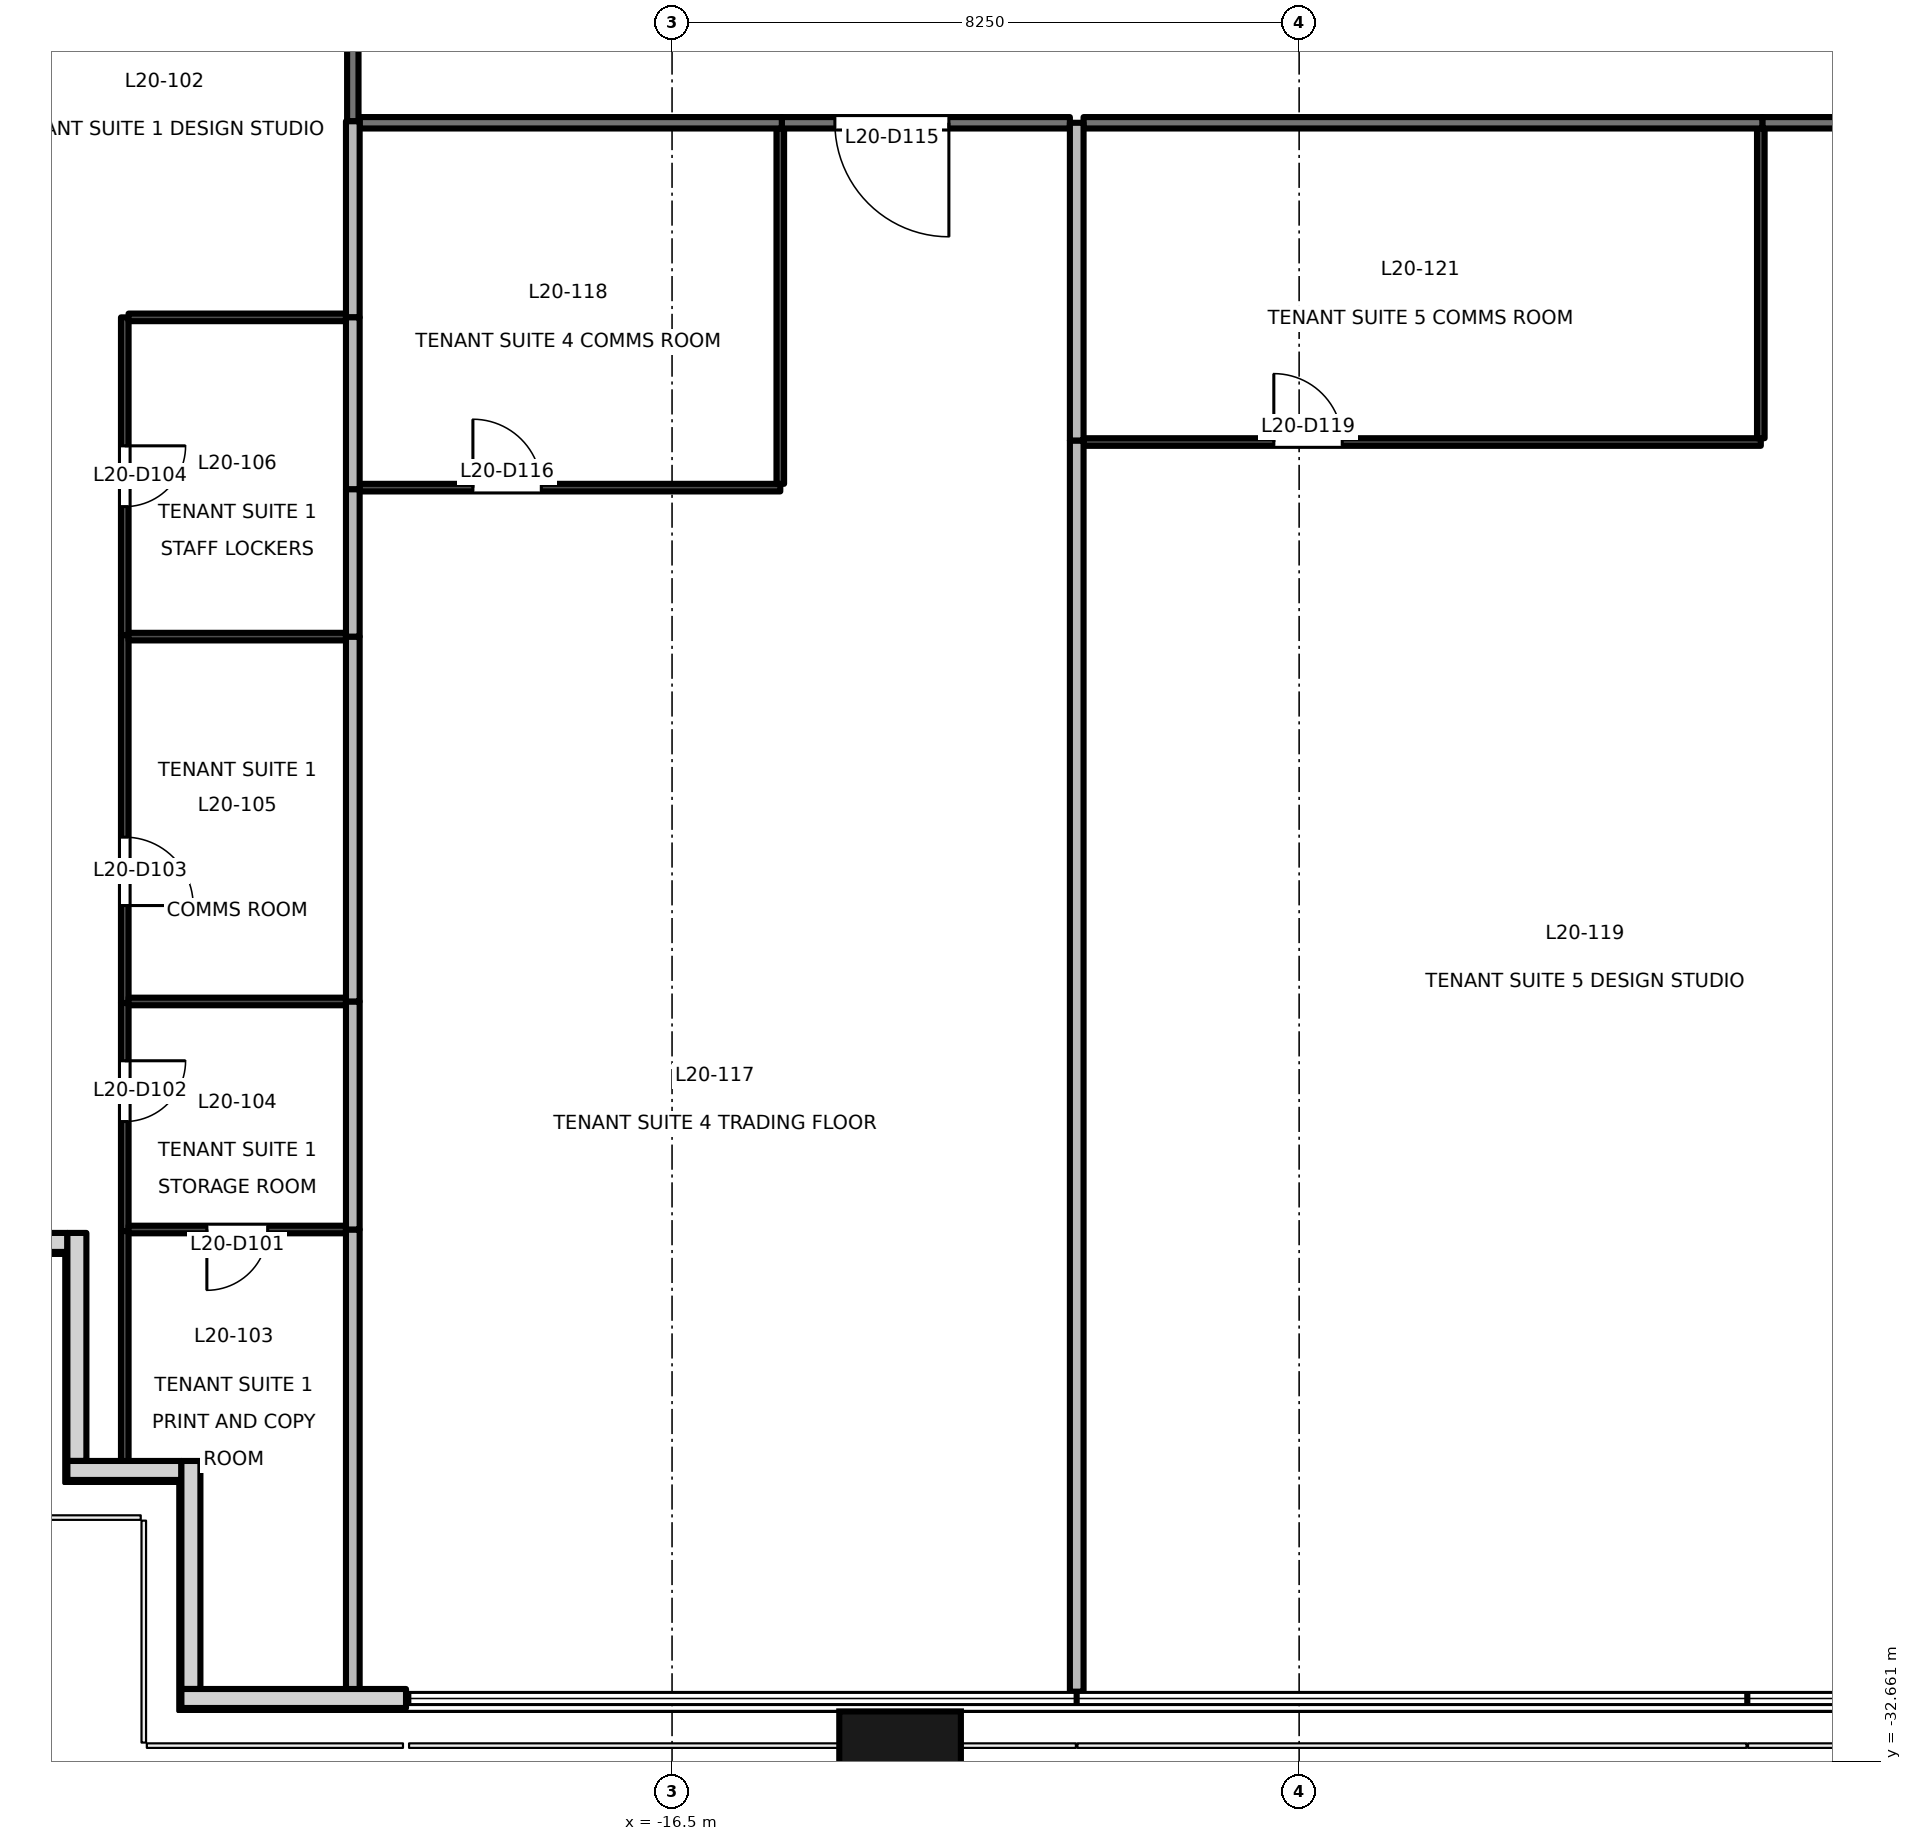
"""IFC4 building model, lengths in metres.
Left out: names, types, materials, properties, quantities, classifications, styles, units other than length and angle.
Written with IfcOpenShell. Run it as: python <this file> out.ifc"""

import sys

from ifc_helpers import new_model, si_unit, direction, frame, frame_2d, origin, origin_2d, place, context, subcontext, project, spatial, rectangle, extrude, element, fill, save


model = new_model("IFC4")
c1 = context("Model", 3, precision=1e-05, world=origin(), true_north=direction((0.0, 1.0)))
c2 = subcontext(c1, "Body", "Model", "MODEL_VIEW")
j1 = project(units=[si_unit("LENGTHUNIT", "METRE"), si_unit("PLANEANGLEUNIT", "RADIAN")], contexts=[c1])
p1 = place(None, origin())
s1 = spatial("IfcSite", under=j1, at=p1, CompositionType="ELEMENT")
p2 = place(p1, origin())
s2 = spatial("IfcBuilding", under=s1, at=p2, CompositionType="ELEMENT")
p3 = place(p2, frame((0.0, 0.0, 91.7)))
s3 = spatial("IfcBuildingStorey", under=s2, at=p3, CompositionType="ELEMENT", Elevation=91.7)
p4 = place(p3, frame((-13.5, -32.9, -0.2), z_axis=(0.0, 0.0, 1.0), x_axis=(1.0, 0.0, 0.0)))
e1 = element("IfcColumn", 1, at=p4, inside=s3, PredefinedType="COLUMN", context=c2, shape_type="SweptSolid", body=[
    extrude(rectangle(XDim=1.6, YDim=1.8, at=origin_2d()), origin(), (0.0, 0.0, 1.0), 4.0),
])
p5 = place(p3, frame((-25.91, -25.83, 0.0), z_axis=(0.0, 0.0, 1.0), x_axis=(1.0, 0.0, 0.0)))
e2 = element("IfcWall", 2, at=p5, inside=s3, PredefinedType="SOLIDWALL", context=c2, shape_type="SweptSolid", body=[
    extrude(rectangle(XDim=1.455, YDim=0.25, at=frame_2d((0.728, 0.0))), origin(), (0.0, 0.0, 1.0), 3.8),
])
p6 = place(p3, frame((-24.33, -25.705, 0.0), z_axis=(0.0, 0.0, 1.0), x_axis=(0.0, -1.0, 0.0)))
e3 = element("IfcWall", 3, at=p6, inside=s3, PredefinedType="SOLIDWALL", context=c2, shape_type="SweptSolid", body=[
    extrude(rectangle(XDim=3.0, YDim=0.25, at=frame_2d((1.5, 0.0))), origin(), (0.0, 0.0, 1.0), 3.8),
])
p7 = place(p3, frame((-24.455, -28.83, 0.0), z_axis=(0.0, 0.0, 1.0), x_axis=(1.0, 0.0, 0.0)))
e4 = element("IfcWall", 4, at=p7, inside=s3, PredefinedType="SOLIDWALL", context=c2, shape_type="SweptSolid", body=[
    extrude(rectangle(XDim=1.5, YDim=0.25, at=frame_2d((0.75, 0.0))), origin(), (0.0, 0.0, 1.0), 3.8),
])
p8 = place(p3, frame((-22.83, -28.705, 0.0), z_axis=(0.0, 0.0, 1.0), x_axis=(0.0, -1.0, 0.0)))
e5 = element("IfcWall", 5, at=p8, inside=s3, PredefinedType="SOLIDWALL", context=c2, shape_type="SweptSolid", body=[
    extrude(rectangle(XDim=3.0, YDim=0.25, at=frame_2d((1.5, 0.0))), origin(), (0.0, 0.0, 1.0), 3.8),
])
p9 = place(p3, frame((-22.955, -31.83, 0.0), z_axis=(0.0, 0.0, 1.0), x_axis=(1.0, 0.0, 0.0)))
e6 = element("IfcWall", 6, at=p9, inside=s3, PredefinedType="SOLIDWALL", context=c2, shape_type="SweptSolid", body=[
    extrude(rectangle(XDim=2.955, YDim=0.25, at=frame_2d((1.478, 0.0))), origin(), (0.0, 0.0, 1.0), 3.8),
])
p10 = place(p3, frame((-20.7, -11.08, 0.0), z_axis=(0.0, 0.0, 1.0), x_axis=(0.0, 1.0, 0.0)))
e7 = element("IfcWall", 7, at=p10, inside=s3, PredefinedType="PARTITIONING", context=c2, shape_type="SweptSolid", body=[
    extrude(rectangle(XDim=3.4, YDim=0.15, at=frame_2d((1.7, 0.0))), origin(), (0.0, 0.0, 1.0), 3.8),
])
p11 = place(p3, frame((-11.266, -11.1, 0.0), z_axis=(0.0, 0.0, 1.0), x_axis=(-1.0, 0.0, 0.0)))
e8 = element("IfcWall", 8, at=p11, inside=s3, PredefinedType="PARTITIONING", context=c2, shape_type="SweptSolid", body=[
    extrude(rectangle(XDim=3.79, YDim=0.15, at=frame_2d((1.895, 0.0))), origin(), (0.0, 0.0, 1.0), 2.8),
])
p12 = place(p11, frame((1.592, 0.0, 0.0)))
e9 = element("IfcOpeningElement", 9, at=p12, cuts=e8, PredefinedType="OPENING", context=c2, shape_type="SweptSolid", body=[
    extrude(rectangle(XDim=1.5, YDim=2.1, at=frame_2d((0.75, 1.05))), frame((0.0, 0.085, 0.0), z_axis=(0.0, -1.0, 0.0), x_axis=(1.0, 0.0, 0.0)), (0.0, 0.0, 1.0), 0.171),
])
p13 = place(p3, frame((-15.056, -11.1, 0.0), z_axis=(0.0, 0.0, 1.0), x_axis=(-1.0, 0.0, 0.0)))
e10 = element("IfcWall", 10, at=p13, inside=s3, PredefinedType="PARTITIONING", context=c2, shape_type="SweptSolid", body=[
    extrude(rectangle(XDim=5.554, YDim=0.15, at=frame_2d((2.777, 0.0))), origin(), (0.0, 0.0, 1.0), 3.8),
])
p14 = place(p3, frame((4.425, -11.1, 0.0), z_axis=(0.0, 0.0, 1.0), x_axis=(-1.0, 0.0, 0.0)))
e11 = element("IfcWall", 11, at=p14, inside=s3, PredefinedType="PARTITIONING", context=c2, shape_type="SweptSolid", body=[
    extrude(rectangle(XDim=6.581, YDim=0.15, at=frame_2d((3.291, 0.0))), origin(), (0.0, 0.0, 1.0), 2.8),
])
p15 = place(p3, frame((-2.156, -11.1, 0.0), z_axis=(0.0, 0.0, 1.0), x_axis=(-1.0, 0.0, 0.0)))
e12 = element("IfcWall", 12, at=p15, inside=s3, PredefinedType="PARTITIONING", context=c2, shape_type="SweptSolid", body=[
    extrude(rectangle(XDim=8.93, YDim=0.15, at=frame_2d((4.465, 0.0))), origin(), (0.0, 0.0, 1.0), 2.8),
])
p16 = place(p3, frame((-23.7, -25.68, 0.0), z_axis=(0.0, 0.0, 1.0), x_axis=(0.0, -1.0, 0.0)))
e13 = element("IfcWall", 13, at=p16, inside=s3, PredefinedType="PARTITIONING", context=c2, shape_type="SweptSolid", body=[
    extrude(rectangle(XDim=3.06, YDim=0.1, at=frame_2d((1.53, 0.0))), origin(), (0.0, 0.0, 1.0), 3.8),
])
p17 = place(p3, frame((-23.7, -22.68, 0.0), z_axis=(0.0, 0.0, 1.0), x_axis=(0.0, -1.0, 0.0)))
e14 = element("IfcWall", 14, at=p17, inside=s3, PredefinedType="PARTITIONING", context=c2, shape_type="SweptSolid", body=[
    extrude(rectangle(XDim=3.0, YDim=0.1, at=frame_2d((1.5, 0.0))), origin(), (0.0, 0.0, 1.0), 3.8),
])
p18 = place(p17, frame((0.76, 0.0, 0.0)))
e15 = element("IfcOpeningElement", 15, at=p18, cuts=e14, PredefinedType="OPENING", context=c2, shape_type="SweptSolid", body=[
    extrude(rectangle(XDim=0.8, YDim=2.1, at=frame_2d((0.4, 1.05))), frame((0.0, 0.061, 0.0), z_axis=(0.0, -1.0, 0.0), x_axis=(1.0, 0.0, 0.0)), (0.0, 0.0, 1.0), 0.121),
])
p19 = place(p3, frame((-23.7, -17.84, 0.0), z_axis=(0.0, 0.0, 1.0), x_axis=(0.0, -1.0, 0.0)))
e16 = element("IfcWall", 16, at=p19, inside=s3, PredefinedType="PARTITIONING", context=c2, shape_type="SweptSolid", body=[
    extrude(rectangle(XDim=4.84, YDim=0.1, at=frame_2d((2.42, 0.0))), origin(), (0.0, 0.0, 1.0), 3.8),
])
p20 = place(p19, frame((2.658, 0.0, 0.0)))
e17 = element("IfcOpeningElement", 17, at=p20, cuts=e16, PredefinedType="OPENING", context=c2, shape_type="SweptSolid", body=[
    extrude(rectangle(XDim=0.9, YDim=2.1, at=frame_2d((0.45, 1.05))), frame((0.0, 0.061, 0.0), z_axis=(0.0, -1.0, 0.0), x_axis=(1.0, 0.0, 0.0)), (0.0, 0.0, 1.0), 0.121),
])
p21 = place(p3, frame((-23.7, -13.66, 0.0), z_axis=(0.0, 0.0, 1.0), x_axis=(0.0, -1.0, 0.0)))
e18 = element("IfcWall", 18, at=p21, inside=s3, PredefinedType="PARTITIONING", context=c2, shape_type="SweptSolid", body=[
    extrude(rectangle(XDim=4.18, YDim=0.1, at=frame_2d((2.09, 0.0))), origin(), (0.0, 0.0, 1.0), 3.8),
])
p22 = place(p21, frame((1.69, 0.0, 0.0)))
e19 = element("IfcOpeningElement", 19, at=p22, cuts=e18, PredefinedType="OPENING", context=c2, shape_type="SweptSolid", body=[
    extrude(rectangle(XDim=0.8, YDim=2.1, at=frame_2d((0.4, 1.05))), frame((0.0, 0.061, 0.0), z_axis=(0.0, -1.0, 0.0), x_axis=(1.0, 0.0, 0.0)), (0.0, 0.0, 1.0), 0.121),
])
p23 = place(p3, frame((-20.79, -13.66, 0.0), z_axis=(0.0, 0.0, 1.0), x_axis=(-1.0, 0.0, 0.0)))
e20 = element("IfcWall", 20, at=p23, inside=s3, PredefinedType="PARTITIONING", context=c2, shape_type="SweptSolid", body=[
    extrude(rectangle(XDim=2.86, YDim=0.1, at=frame_2d((1.43, 0.0))), origin(), (0.0, 0.0, 1.0), 3.8),
])
p24 = place(p3, frame((-20.7, -11.08, 0.0), z_axis=(0.0, 0.0, 1.0), x_axis=(0.0, -1.0, 0.0)))
e21 = element("IfcWall", 21, at=p24, inside=s3, PredefinedType="PARTITIONING", context=c2, shape_type="SweptSolid", body=[
    extrude(rectangle(XDim=2.58, YDim=0.18, at=frame_2d((1.29, 0.0))), origin(), (0.0, 0.0, 1.0), 3.8),
])
p25 = place(p3, frame((-20.79, -25.66, 0.0), z_axis=(0.0, 0.0, 1.0), x_axis=(-1.0, 0.0, 0.0)))
e22 = element("IfcWall", 22, at=p25, inside=s3, PredefinedType="PARTITIONING", context=c2, shape_type="SweptSolid", body=[
    extrude(rectangle(XDim=2.86, YDim=0.1, at=frame_2d((1.43, 0.0))), origin(), (0.0, 0.0, 1.0), 3.8),
])
p26 = place(p25, frame((1.03, 0.0, 0.0)))
e23 = element("IfcOpeningElement", 23, at=p26, cuts=e22, PredefinedType="OPENING", context=c2, shape_type="SweptSolid", body=[
    extrude(rectangle(XDim=0.8, YDim=2.1, at=frame_2d((0.4, 1.05))), frame((0.0, 0.061, 0.0), z_axis=(0.0, -1.0, 0.0), x_axis=(1.0, 0.0, 0.0)), (0.0, 0.0, 1.0), 0.121),
])
p27 = place(p3, frame((-20.7, -25.66, 0.0), z_axis=(0.0, 0.0, 1.0), x_axis=(0.0, -1.0, 0.0)))
e24 = element("IfcWall", 24, at=p27, inside=s3, PredefinedType="PARTITIONING", context=c2, shape_type="SweptSolid", body=[
    extrude(rectangle(XDim=6.08, YDim=0.18, at=frame_2d((3.04, 0.0))), origin(), (0.0, 0.0, 1.0), 3.8),
])
p28 = place(p3, frame((-23.65, -22.66, 0.0), z_axis=(0.0, 0.0, 1.0), x_axis=(1.0, 0.0, 0.0)))
e25 = element("IfcWall", 25, at=p28, inside=s3, PredefinedType="PARTITIONING", context=c2, shape_type="SweptSolid", body=[
    extrude(rectangle(XDim=2.86, YDim=0.1, at=frame_2d((1.43, 0.0))), origin(), (0.0, 0.0, 1.0), 3.8),
])
p29 = place(p3, frame((-20.7, -22.66, 0.0), z_axis=(0.0, 0.0, 1.0), x_axis=(0.0, -1.0, 0.0)))
e26 = element("IfcWall", 26, at=p29, inside=s3, PredefinedType="PARTITIONING", context=c2, shape_type="SweptSolid", body=[
    extrude(rectangle(XDim=3.0, YDim=0.18, at=frame_2d((1.5, 0.0))), origin(), (0.0, 0.0, 1.0), 3.8),
])
p30 = place(p3, frame((-23.65, -17.86, 0.0), z_axis=(0.0, 0.0, 1.0), x_axis=(1.0, 0.0, 0.0)))
e27 = element("IfcWall", 27, at=p30, inside=s3, PredefinedType="PARTITIONING", context=c2, shape_type="SweptSolid", body=[
    extrude(rectangle(XDim=2.86, YDim=0.1, at=frame_2d((1.43, 0.0))), origin(), (0.0, 0.0, 1.0), 3.8),
])
p31 = place(p3, frame((-20.7, -17.86, 0.0), z_axis=(0.0, 0.0, 1.0), x_axis=(0.0, -1.0, 0.0)))
e28 = element("IfcWall", 28, at=p31, inside=s3, PredefinedType="PARTITIONING", context=c2, shape_type="SweptSolid", body=[
    extrude(rectangle(XDim=4.8, YDim=0.18, at=frame_2d((2.4, 0.0))), origin(), (0.0, 0.0, 1.0), 3.8),
])
p32 = place(p3, frame((-20.7, -15.92, 0.0), z_axis=(0.0, 0.0, 1.0), x_axis=(0.0, -1.0, 0.0)))
e29 = element("IfcWall", 29, at=p32, inside=s3, PredefinedType="PARTITIONING", context=c2, shape_type="SweptSolid", body=[
    extrude(rectangle(XDim=1.94, YDim=0.18, at=frame_2d((0.97, 0.0))), origin(), (0.0, 0.0, 1.0), 3.8),
])
p33 = place(p3, frame((-20.7, -13.66, 0.0), z_axis=(0.0, 0.0, 1.0), x_axis=(0.0, -1.0, 0.0)))
e30 = element("IfcWall", 30, at=p33, inside=s3, PredefinedType="PARTITIONING", context=c2, shape_type="SweptSolid", body=[
    extrude(rectangle(XDim=2.26, YDim=0.18, at=frame_2d((1.13, 0.0))), origin(), (0.0, 0.0, 1.0), 3.8),
])
p34 = place(p3, frame((-20.61, -15.9, 0.0), z_axis=(0.0, 0.0, 1.0), x_axis=(1.0, 0.0, 0.0)))
e31 = element("IfcWall", 31, at=p34, inside=s3, PredefinedType="PARTITIONING", context=c2, shape_type="SweptSolid", body=[
    extrude(rectangle(XDim=5.534, YDim=0.1, at=frame_2d((2.767, 0.0))), origin(), (0.0, 0.0, 1.0), 3.8),
])
p35 = place(p34, frame((1.49, 0.0, 0.0)))
e32 = element("IfcOpeningElement", 32, at=p35, cuts=e31, PredefinedType="OPENING", context=c2, shape_type="SweptSolid", body=[
    extrude(rectangle(XDim=0.9, YDim=2.1, at=frame_2d((0.45, 1.05))), frame((0.0, 0.061, 0.0), z_axis=(0.0, -1.0, 0.0), x_axis=(1.0, 0.0, 0.0)), (0.0, 0.0, 1.0), 0.121),
])
p36 = place(p3, frame((-15.076, -15.85, 0.0), z_axis=(0.0, 0.0, 1.0), x_axis=(0.0, 1.0, 0.0)))
e33 = element("IfcWall", 33, at=p36, inside=s3, PredefinedType="PARTITIONING", context=c2, shape_type="SweptSolid", body=[
    extrude(rectangle(XDim=4.675, YDim=0.1, at=frame_2d((2.337, 0.0))), origin(), (0.0, 0.0, 1.0), 3.8),
])
p37 = place(p3, frame((-11.176, -15.28, 0.0), z_axis=(0.0, 0.0, 1.0), x_axis=(0.0, -1.0, 0.0)))
e34 = element("IfcWall", 34, at=p37, inside=s3, PredefinedType="PARTITIONING", context=c2, shape_type="SweptSolid", body=[
    extrude(rectangle(XDim=16.46, YDim=0.18, at=frame_2d((8.23, 0.0))), origin(), (0.0, 0.0, 1.0), 3.8),
])
p38 = place(p3, frame((-11.176, -11.1, 0.0), z_axis=(0.0, 0.0, 1.0), x_axis=(0.0, -1.0, 0.0)))
e35 = element("IfcWall", 35, at=p38, inside=s3, PredefinedType="PARTITIONING", context=c2, shape_type="SweptSolid", body=[
    extrude(rectangle(XDim=4.18, YDim=0.18, at=frame_2d((2.09, 0.0))), origin(), (0.0, 0.0, 1.0), 3.8),
])
p39 = place(p3, frame((-11.086, -15.3, 0.0), z_axis=(0.0, 0.0, 1.0), x_axis=(1.0, 0.0, 0.0)))
e36 = element("IfcWall", 36, at=p39, inside=s3, PredefinedType="PARTITIONING", context=c2, shape_type="SweptSolid", body=[
    extrude(rectangle(XDim=8.91, YDim=0.1, at=frame_2d((4.455, 0.0))), origin(), (0.0, 0.0, 1.0), 2.8),
])
p40 = place(p39, frame((2.503, 0.0, 0.0)))
e37 = element("IfcOpeningElement", 37, at=p40, cuts=e36, PredefinedType="OPENING", context=c2, shape_type="SweptSolid", body=[
    extrude(rectangle(XDim=0.9, YDim=2.1, at=frame_2d((0.45, 1.05))), frame((0.0, 0.061, 0.0), z_axis=(0.0, -1.0, 0.0), x_axis=(1.0, 0.0, 0.0)), (0.0, 0.0, 1.0), 0.121),
])
p41 = place(p3, frame((-2.176, -15.25, 0.0), z_axis=(0.0, 0.0, 1.0), x_axis=(0.0, 1.0, 0.0)))
e38 = element("IfcWall", 38, at=p41, inside=s3, PredefinedType="PARTITIONING", context=c2, shape_type="SweptSolid", body=[
    extrude(rectangle(XDim=4.075, YDim=0.1, at=frame_2d((2.038, 0.0))), origin(), (0.0, 0.0, 1.0), 3.8),
])
p42 = place(p26, origin())
e39 = element("IfcDoor", 39, at=p42, inside=s3, OperationType="SINGLE_SWING_RIGHT", PredefinedType="DOOR", context=c2, shape_type="SweptSolid", body=[
    extrude(rectangle(XDim=0.8, YDim=2.1, at=frame_2d((0.4, 1.05))), frame((0.0, 0.025, 0.0), z_axis=(0.0, -1.0, 0.0), x_axis=(1.0, 0.0, 0.0)), (0.0, 0.0, 1.0), 0.05),
])
fill(e23, e39)
p43 = place(p18, origin())
e40 = element("IfcDoor", 40, at=p43, inside=s3, OperationType="SINGLE_SWING_LEFT", PredefinedType="DOOR", context=c2, shape_type="SweptSolid", body=[
    extrude(rectangle(XDim=0.8, YDim=2.1, at=frame_2d((0.4, 1.05))), frame((0.0, 0.025, 0.0), z_axis=(0.0, -1.0, 0.0), x_axis=(1.0, 0.0, 0.0)), (0.0, 0.0, 1.0), 0.05),
])
fill(e15, e40)
p44 = place(p20, origin())
e41 = element("IfcDoor", 41, at=p44, inside=s3, OperationType="SINGLE_SWING_RIGHT", PredefinedType="DOOR", context=c2, shape_type="SweptSolid", body=[
    extrude(rectangle(XDim=0.9, YDim=2.1, at=frame_2d((0.45, 1.05))), frame((0.0, 0.025, 0.0), z_axis=(0.0, -1.0, 0.0), x_axis=(1.0, 0.0, 0.0)), (0.0, 0.0, 1.0), 0.05),
])
fill(e17, e41)
p45 = place(p22, origin())
e42 = element("IfcDoor", 42, at=p45, inside=s3, OperationType="SINGLE_SWING_LEFT", PredefinedType="DOOR", context=c2, shape_type="SweptSolid", body=[
    extrude(rectangle(XDim=0.8, YDim=2.1, at=frame_2d((0.4, 1.05))), frame((0.0, 0.025, 0.0), z_axis=(0.0, -1.0, 0.0), x_axis=(1.0, 0.0, 0.0)), (0.0, 0.0, 1.0), 0.05),
])
fill(e19, e42)
p46 = place(p12, origin())
e43 = element("IfcDoor", 43, at=p46, inside=s3, OperationType="DOUBLE_DOOR_SINGLE_SWING", PredefinedType="DOOR", context=c2, shape_type="SweptSolid", body=[
    extrude(rectangle(XDim=1.5, YDim=2.1, at=frame_2d((0.75, 1.05))), frame((0.0, 0.025, 0.0), z_axis=(0.0, -1.0, 0.0), x_axis=(1.0, 0.0, 0.0)), (0.0, 0.0, 1.0), 0.05),
])
fill(e9, e43)
p47 = place(p35, origin())
e44 = element("IfcDoor", 44, at=p47, inside=s3, OperationType="SINGLE_SWING_LEFT", PredefinedType="DOOR", context=c2, shape_type="SweptSolid", body=[
    extrude(rectangle(XDim=0.9, YDim=2.1, at=frame_2d((0.45, 1.05))), frame((0.0, 0.025, 0.0), z_axis=(0.0, -1.0, 0.0), x_axis=(1.0, 0.0, 0.0)), (0.0, 0.0, 1.0), 0.05),
])
fill(e32, e44)
p48 = place(p40, origin())
e45 = element("IfcDoor", 45, at=p48, inside=s3, OperationType="SINGLE_SWING_LEFT", PredefinedType="DOOR", context=c2, shape_type="SweptSolid", body=[
    extrude(rectangle(XDim=0.9, YDim=2.1, at=frame_2d((0.45, 1.05))), frame((0.0, 0.025, 0.0), z_axis=(0.0, -1.0, 0.0), x_axis=(1.0, 0.0, 0.0)), (0.0, 0.0, 1.0), 0.05),
])
fill(e37, e45)
save(model, sys.argv[1])
